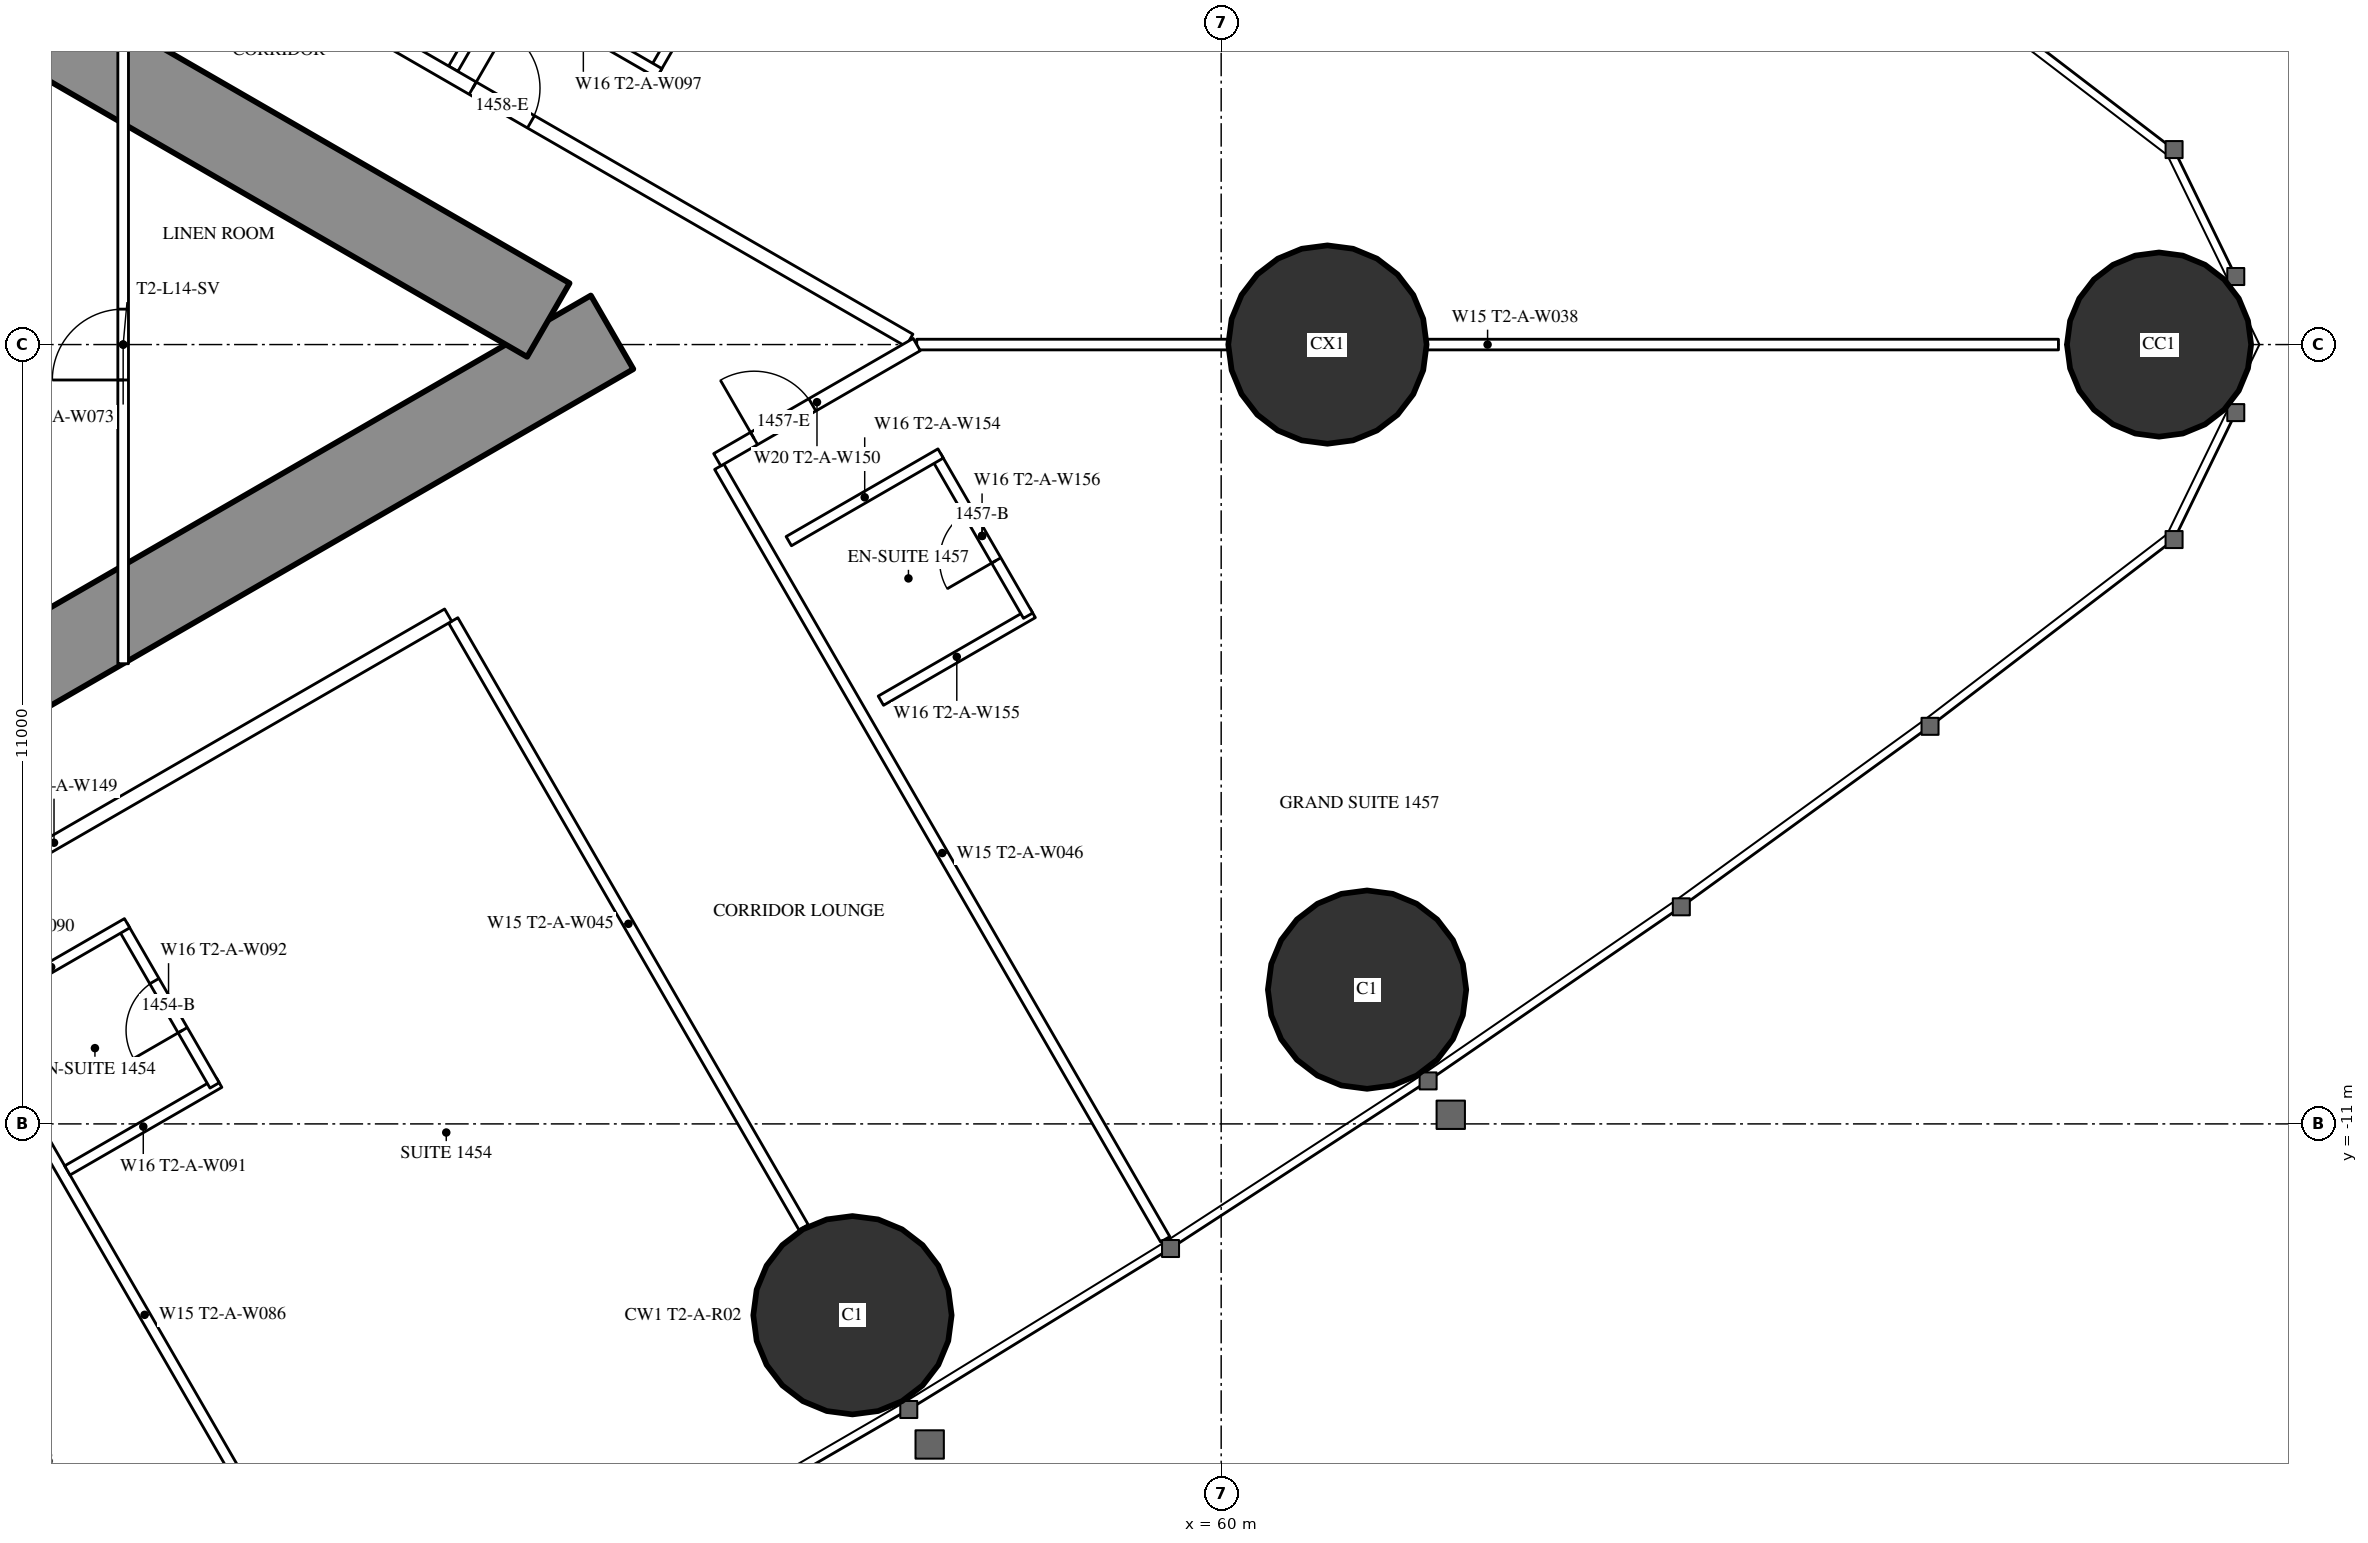
"""IFC4 building model, lengths in metres.
Left out: names, types, materials, properties, quantities, classifications, styles, units other than length and angle.
Written with IfcOpenShell. Run it as: python <this file> out.ifc"""

import sys

from ifc_helpers import new_model, si_unit, direction, frame, frame_2d, origin, origin_2d, place, context, subcontext, project, spatial, rectangle, hollow_circle, extrude, element, fill, save


model = new_model("IFC4")
c1 = context("Model", 3, precision=1e-05, world=origin(), true_north=direction((0.0, 1.0)))
c2 = subcontext(c1, "Body", "Model", "MODEL_VIEW")
j1 = project(units=[si_unit("LENGTHUNIT", "METRE"), si_unit("PLANEANGLEUNIT", "RADIAN")], contexts=[c1])
p1 = place(None, origin())
s1 = spatial("IfcSite", under=j1, at=p1, CompositionType="ELEMENT")
p2 = place(p1, origin())
s2 = spatial("IfcBuilding", under=s1, at=p2, CompositionType="ELEMENT")
p3 = place(p2, frame((0.0, 0.0, 56.5)))
s3 = spatial("IfcBuildingStorey", under=s2, at=p3, CompositionType="ELEMENT", Elevation=56.5)
p4 = place(p3, frame((73.239, 0.0, 0.0), z_axis=(0.0, 0.0, 1.0), x_axis=(1.0, 0.0, 0.0)))
e1 = element("IfcColumn", 1, at=p4, inside=s3, PredefinedType="COLUMN", context=c2, shape_type="SweptSolid", body=[
    extrude(hollow_circle(Radius=1.3, WallThickness=0.1, at=origin_2d()), origin(), (0.0, 0.0, 1.0), 3.5),
])
for number, where, z_axis, x_axis in (
    (2, (54.795, -13.701, 0.0), (0.0, 0.0, 1.0), (1.0, 0.0, 0.0)),
    (3, (62.059, -9.105, 0.0), (0.0, 0.0, 1.0), (1.0, 0.0, 0.0)),
):
    element("IfcColumn", number, at=place(p3, frame(where, z_axis=z_axis, x_axis=x_axis)), inside=s3, PredefinedType="COLUMN", context=c2, shape_type="SweptSolid", body=[
        extrude(hollow_circle(Radius=1.4, WallThickness=0.12, at=origin_2d()), origin(), (0.0, 0.0, 1.0), 3.5),
    ])
p5 = place(p3, frame((61.5, 0.0, 0.0), z_axis=(0.0, 0.0, 1.0), x_axis=(1.0, 0.0, 0.0)))
e4 = element("IfcColumn", 4, at=p5, inside=s3, PredefinedType="COLUMN", context=c2, shape_type="SweptSolid", body=[
    extrude(hollow_circle(Radius=1.4, WallThickness=0.1, at=origin_2d()), origin(), (0.0, 0.0, 1.0), 3.5),
])
p6 = place(p3, frame((27.2, -13.8, 0.0), z_axis=(0.0, 0.0, 1.0), x_axis=(0.866027159892, 0.499996958321, 0.0)))
e5 = element("IfcWall", 5, at=p6, inside=s3, PredefinedType="SHEAR", context=c2, shape_type="SweptSolid", body=[
    extrude(rectangle(XDim=27.947, YDim=1.2, at=frame_2d((13.973, 0.0))), origin(), (0.0, 0.0, 1.0), 3.5),
])
p7 = place(p6, frame((4.6, 0.0, 0.0)))
e6 = element("IfcOpeningElement", 6, at=p7, cuts=e5, PredefinedType="OPENING", context=c2, shape_type="SweptSolid", body=[
    extrude(rectangle(XDim=1.0, YDim=2.2, at=frame_2d((0.5, 1.1))), frame((0.0, 0.61, 0.0), z_axis=(0.0, -1.0, 0.0), x_axis=(1.0, 0.0, 0.0)), (0.0, 0.0, 1.0), 1.22),
])
p8 = place(p6, frame((13.395, 0.0, 0.0)))
e7 = element("IfcOpeningElement", 7, at=p8, cuts=e5, PredefinedType="OPENING", context=c2, shape_type="SweptSolid", body=[
    extrude(rectangle(XDim=1.8, YDim=2.2, at=frame_2d((0.9, 1.1))), frame((0.0, 0.61, 0.0), z_axis=(0.0, -1.0, 0.0), x_axis=(1.0, 0.0, 0.0)), (0.0, 0.0, 1.0), 1.22),
])
p9 = place(p3, frame((27.2, 13.8, 0.0), z_axis=(0.0, 0.0, 1.0), x_axis=(0.866024515034, -0.500001539357, 0.0)))
e8 = element("IfcWall", 8, at=p9, inside=s3, PredefinedType="SHEAR", context=c2, shape_type="SweptSolid", body=[
    extrude(rectangle(XDim=26.907, YDim=1.2, at=frame_2d((13.454, 0.0))), origin(), (0.0, 0.0, 1.0), 3.5),
])
p10 = place(p9, frame((4.6, 0.0, 0.0)))
e9 = element("IfcOpeningElement", 9, at=p10, cuts=e8, PredefinedType="OPENING", context=c2, shape_type="SweptSolid", body=[
    extrude(rectangle(XDim=1.0, YDim=2.2, at=frame_2d((0.5, 1.1))), frame((0.0, 0.61, 0.0), z_axis=(0.0, -1.0, 0.0), x_axis=(1.0, 0.0, 0.0)), (0.0, 0.0, 1.0), 1.22),
])
p11 = place(p9, frame((13.395, 0.0, 0.0)))
e10 = element("IfcOpeningElement", 10, at=p11, cuts=e8, PredefinedType="OPENING", context=c2, shape_type="SweptSolid", body=[
    extrude(rectangle(XDim=1.8, YDim=2.2, at=frame_2d((0.9, 1.1))), frame((0.0, 0.61, 0.0), z_axis=(0.0, -1.0, 0.0), x_axis=(1.0, 0.0, 0.0)), (0.0, 0.0, 1.0), 1.22),
])
p12 = place(p3, frame((41.647, -8.23, 0.0), z_axis=(0.0, 0.0, 1.0), x_axis=(0.49998590462, -0.866033541603, 0.0)))
e11 = element("IfcWall", 11, at=p12, inside=s3, PredefinedType="PARTITIONING", context=c2, shape_type="SweptSolid", body=[
    extrude(rectangle(XDim=12.621, YDim=0.15, at=frame_2d((6.311, 0.0))), origin(), (0.0, 0.0, 1.0), 3.25),
])
p13 = place(p3, frame((49.159, -3.893, 0.0), z_axis=(0.0, 0.0, 1.0), x_axis=(0.499998773722, -0.866026111775, 0.0)))
e12 = element("IfcWall", 12, at=p13, inside=s3, PredefinedType="PARTITIONING", context=c2, shape_type="SweptSolid", body=[
    extrude(rectangle(XDim=9.892, YDim=0.15, at=frame_2d((4.946, 0.0))), origin(), (0.0, 0.0, 1.0), 2.25),
])
p14 = place(p3, frame((52.915, -1.725, 0.0), z_axis=(0.0, 0.0, 1.0), x_axis=(0.499997163113, -0.866027041656, 0.0)))
e13 = element("IfcWall", 13, at=p14, inside=s3, PredefinedType="PARTITIONING", context=c2, shape_type="SweptSolid", body=[
    extrude(rectangle(XDim=12.591, YDim=0.15, at=frame_2d((6.295, 0.0))), origin(), (0.0, 0.0, 1.0), 3.25),
])
p15 = place(p3, frame((49.159, 3.893, 0.0), z_axis=(0.0, 0.0, 1.0), x_axis=(0.499995664361, 0.866027906952, 0.0)))
e14 = element("IfcWall", 14, at=p15, inside=s3, PredefinedType="PARTITIONING", context=c2, shape_type="SweptSolid", body=[
    extrude(rectangle(XDim=12.711, YDim=0.15, at=frame_2d((6.356, 0.0))), origin(), (0.0, 0.0, 1.0), 3.25),
])
p16 = place(p3, frame((55.702, 0.0, 0.0), z_axis=(0.0, 0.0, 1.0), x_axis=(1.0, 0.0, 0.0)))
e15 = element("IfcWall", 15, at=p16, inside=s3, PredefinedType="PARTITIONING", context=c2, shape_type="SweptSolid", body=[
    extrude(rectangle(XDim=16.117, YDim=0.15, at=frame_2d((8.059, 0.0))), origin(), (0.0, 0.0, 1.0), 2.25),
])
p17 = place(p3, frame((36.834, 10.894, 0.0), z_axis=(0.0, 0.0, 1.0), x_axis=(0.866028157229, -0.499995230863, 0.0)))
e16 = element("IfcWall", 16, at=p17, inside=s3, PredefinedType="PARTITIONING", context=c2, shape_type="SweptSolid", body=[
    extrude(rectangle(XDim=21.667, YDim=0.2, at=frame_2d((10.833, 0.0))), origin(), (0.0, 0.0, 1.0), 3.25),
])
p18 = place(p17, frame((14.55, 0.0, 0.0)))
e17 = element("IfcOpeningElement", 17, at=p18, cuts=e16, PredefinedType="OPENING", context=c2, shape_type="SweptSolid", body=[
    extrude(rectangle(XDim=0.95, YDim=2.2, at=frame_2d((0.475, 1.1))), frame((0.0, 0.11, 0.0), z_axis=(0.0, -1.0, 0.0), x_axis=(1.0, 0.0, 0.0)), (0.0, 0.0, 1.0), 0.22),
])
p19 = place(p17, frame((10.5, 0.0, 0.0)))
e18 = element("IfcOpeningElement", 18, at=p19, cuts=e16, PredefinedType="OPENING", context=c2, shape_type="SweptSolid", body=[
    extrude(rectangle(XDim=0.95, YDim=2.2, at=frame_2d((0.475, 1.1))), frame((0.0, 0.11, 0.0), z_axis=(0.0, -1.0, 0.0), x_axis=(1.0, 0.0, 0.0)), (0.0, 0.0, 1.0), 0.22),
])
p20 = place(p17, frame((4.292, 0.0, 0.0)))
e19 = element("IfcOpeningElement", 19, at=p20, cuts=e16, PredefinedType="OPENING", context=c2, shape_type="SweptSolid", body=[
    extrude(rectangle(XDim=1.0, YDim=2.2, at=frame_2d((0.5, 1.1))), frame((0.0, 0.11, 0.0), z_axis=(0.0, -1.0, 0.0), x_axis=(1.0, 0.0, 0.0)), (0.0, 0.0, 1.0), 0.22),
])
p21 = place(p17, frame((0.246, 0.0, 0.0)))
e20 = element("IfcOpeningElement", 20, at=p21, cuts=e16, PredefinedType="OPENING", context=c2, shape_type="SweptSolid", body=[
    extrude(rectangle(XDim=0.9, YDim=2.2, at=frame_2d((0.45, 1.1))), frame((0.0, 0.11, 0.0), z_axis=(0.0, -1.0, 0.0), x_axis=(1.0, 0.0, 0.0)), (0.0, 0.0, 1.0), 0.22),
])
p22 = place(p3, frame((37.96, -10.243, 0.0), z_axis=(0.0, 0.0, 1.0), x_axis=(0.866030548046, 0.499991089772, 0.0)))
e21 = element("IfcWall", 21, at=p22, inside=s3, PredefinedType="PARTITIONING", context=c2, shape_type="SweptSolid", body=[
    extrude(rectangle(XDim=12.849, YDim=0.2, at=frame_2d((6.425, 0.0))), origin(), (0.0, 0.0, 1.0), 3.25),
])
p23 = place(p22, frame((4.575, 0.0, 0.0)))
e22 = element("IfcOpeningElement", 22, at=p23, cuts=e21, PredefinedType="OPENING", context=c2, shape_type="SweptSolid", body=[
    extrude(rectangle(XDim=0.95, YDim=2.2, at=frame_2d((0.475, 1.1))), frame((0.0, 0.11, 0.0), z_axis=(0.0, -1.0, 0.0), x_axis=(1.0, 0.0, 0.0)), (0.0, 0.0, 1.0), 0.22),
])
p24 = place(p22, frame((0.6, 0.0, 0.0)))
e23 = element("IfcOpeningElement", 23, at=p24, cuts=e21, PredefinedType="OPENING", context=c2, shape_type="SweptSolid", body=[
    extrude(rectangle(XDim=0.95, YDim=2.2, at=frame_2d((0.475, 1.1))), frame((0.0, 0.11, 0.0), z_axis=(0.0, -1.0, 0.0), x_axis=(1.0, 0.0, 0.0)), (0.0, 0.0, 1.0), 0.22),
])
p25 = place(p3, frame((52.886, -1.626, 0.0), z_axis=(0.0, 0.0, 1.0), x_axis=(0.866030540913, 0.499991102127, 0.0)))
e24 = element("IfcWall", 24, at=p25, inside=s3, PredefinedType="PARTITIONING", context=c2, shape_type="SweptSolid", body=[
    extrude(rectangle(XDim=3.251, YDim=0.2, at=frame_2d((1.626, 0.0))), origin(), (0.0, 0.0, 1.0), 3.25),
])
p26 = place(p25, frame((0.6, 0.0, 0.0)))
e25 = element("IfcOpeningElement", 25, at=p26, cuts=e24, PredefinedType="OPENING", context=c2, shape_type="SweptSolid", body=[
    extrude(rectangle(XDim=0.95, YDim=2.2, at=frame_2d((0.475, 1.1))), frame((0.0, 0.11, 0.0), z_axis=(0.0, -1.0, 0.0), x_axis=(1.0, 0.0, 0.0)), (0.0, 0.0, 1.0), 0.22),
])
p27 = place(p3, frame((43.712, -11.657, 0.0), z_axis=(0.0, 0.0, 1.0), x_axis=(0.866006523861, 0.500032699561, 0.0)))
e26 = element("IfcWall", 26, at=p27, inside=s3, PredefinedType="PARTITIONING", context=c2, shape_type="SweptSolid", body=[
    extrude(rectangle(XDim=2.475, YDim=0.15, at=frame_2d((1.237, 0.0))), origin(), (0.0, 0.0, 1.0), 3.25),
])
p28 = place(p3, frame((44.491, -8.205, 0.0), z_axis=(0.0, 0.0, 1.0), x_axis=(0.500047596559, -0.865997922154, 0.0)))
e27 = element("IfcWall", 27, at=p28, inside=s3, PredefinedType="PARTITIONING", context=c2, shape_type="SweptSolid", body=[
    extrude(rectangle(XDim=2.6, YDim=0.15, at=frame_2d((1.3, 0.0))), origin(), (0.0, 0.0, 1.0), 3.25),
])
p29 = place(p28, frame((0.9, 0.0, 0.0)))
e28 = element("IfcOpeningElement", 28, at=p29, cuts=e27, PredefinedType="OPENING", context=c2, shape_type="SweptSolid", body=[
    extrude(rectangle(XDim=0.8, YDim=2.2, at=frame_2d((0.4, 1.1))), frame((0.0, 0.085, 0.0), z_axis=(0.0, -1.0, 0.0), x_axis=(1.0, 0.0, 0.0)), (0.0, 0.0, 1.0), 0.17),
])
p30 = place(p3, frame((42.412, -9.405, 0.0), z_axis=(0.0, 0.0, 1.0), x_axis=(0.866006523861, 0.500032699561, 0.0)))
e29 = element("IfcWall", 29, at=p30, inside=s3, PredefinedType="PARTITIONING", context=c2, shape_type="SweptSolid", body=[
    extrude(rectangle(XDim=2.475, YDim=0.15, at=frame_2d((1.237, 0.0))), origin(), (0.0, 0.0, 1.0), 3.25),
])
p31 = place(p3, frame((55.196, -5.026, 0.0), z_axis=(0.0, 0.0, 1.0), x_axis=(0.866073894602, 0.499916002032, 0.0)))
e30 = element("IfcWall", 30, at=p31, inside=s3, PredefinedType="PARTITIONING", context=c2, shape_type="SweptSolid", body=[
    extrude(rectangle(XDim=2.475, YDim=0.15, at=frame_2d((1.238, 0.0))), origin(), (0.0, 0.0, 1.0), 3.25),
])
p32 = place(p3, frame((55.975, -1.575, 0.0), z_axis=(0.0, 0.0, 1.0), x_axis=(0.500006934395, -0.866021400173, 0.0)))
e31 = element("IfcWall", 31, at=p32, inside=s3, PredefinedType="PARTITIONING", context=c2, shape_type="SweptSolid", body=[
    extrude(rectangle(XDim=2.6, YDim=0.15, at=frame_2d((1.3, 0.0))), origin(), (0.0, 0.0, 1.0), 3.25),
])
p33 = place(p32, frame((0.9, 0.0, 0.0)))
e32 = element("IfcOpeningElement", 32, at=p33, cuts=e31, PredefinedType="OPENING", context=c2, shape_type="SweptSolid", body=[
    extrude(rectangle(XDim=0.8, YDim=2.2, at=frame_2d((0.4, 1.1))), frame((0.0, 0.085, 0.0), z_axis=(0.0, -1.0, 0.0), x_axis=(1.0, 0.0, 0.0)), (0.0, 0.0, 1.0), 0.17),
])
p34 = place(p3, frame((53.896, -2.775, 0.0), z_axis=(0.0, 0.0, 1.0), x_axis=(0.866006523861, 0.500032699561, 0.0)))
e33 = element("IfcWall", 33, at=p34, inside=s3, PredefinedType="PARTITIONING", context=c2, shape_type="SweptSolid", body=[
    extrude(rectangle(XDim=2.475, YDim=0.15, at=frame_2d((1.237, 0.0))), origin(), (0.0, 0.0, 1.0), 3.25),
])
p35 = place(p3, frame((52.003, 3.868, 0.0), z_axis=(0.0, 0.0, 1.0), x_axis=(0.500047596559, 0.865997922154, 0.0)))
e34 = element("IfcWall", 34, at=p35, inside=s3, PredefinedType="PARTITIONING", context=c2, shape_type="SweptSolid", body=[
    extrude(rectangle(XDim=2.6, YDim=0.15, at=frame_2d((1.3, 0.0))), origin(), (0.0, 0.0, 1.0), 3.25),
])
p36 = place(p35, frame((0.9, 0.0, 0.0)))
e35 = element("IfcOpeningElement", 35, at=p36, cuts=e34, PredefinedType="OPENING", context=c2, shape_type="SweptSolid", body=[
    extrude(rectangle(XDim=0.8, YDim=2.2, at=frame_2d((0.4, 1.1))), frame((0.0, 0.085, 0.0), z_axis=(0.0, -1.0, 0.0), x_axis=(1.0, 0.0, 0.0)), (0.0, 0.0, 1.0), 0.17),
])
p37 = place(p3, frame((49.925, 5.068, 0.0), z_axis=(0.0, 0.0, 1.0), x_axis=(0.866006523861, -0.500032699561, 0.0)))
e36 = element("IfcWall", 36, at=p37, inside=s3, PredefinedType="PARTITIONING", context=c2, shape_type="SweptSolid", body=[
    extrude(rectangle(XDim=2.475, YDim=0.15, at=frame_2d((1.237, 0.0))), origin(), (0.0, 0.0, 1.0), 3.25),
])
p38 = place(p3, frame((44.5, -4.505, 0.0), z_axis=(0.0, 0.0, 1.0), x_axis=(0.0, 1.0, 0.0)))
e37 = element("IfcWall", 37, at=p38, inside=s3, PredefinedType="PARTITIONING", context=c2, shape_type="SweptSolid", body=[
    extrude(rectangle(XDim=9.009, YDim=0.15, at=frame_2d((4.505, 0.0))), origin(), (0.0, 0.0, 1.0), 2.45),
])
p39 = place(p38, frame((4.005, 0.0, 0.0)))
e38 = element("IfcOpeningElement", 38, at=p39, cuts=e37, PredefinedType="OPENING", context=c2, shape_type="SweptSolid", body=[
    extrude(rectangle(XDim=1.0, YDim=2.2, at=frame_2d((0.5, 1.1))), frame((0.0, 0.085, 0.0), z_axis=(0.0, -1.0, 0.0), x_axis=(1.0, 0.0, 0.0)), (0.0, 0.0, 1.0), 0.17),
])
p40 = place(p29, origin())
e39 = element("IfcDoor", 39, at=p40, inside=s3, OperationType="SINGLE_SWING_RIGHT", PredefinedType="DOOR", context=c2, shape_type="SweptSolid", body=[
    extrude(rectangle(XDim=0.8, YDim=2.2, at=frame_2d((0.4, 1.1))), frame((0.0, 0.025, 0.0), z_axis=(0.0, -1.0, 0.0), x_axis=(1.0, 0.0, 0.0)), (0.0, 0.0, 1.0), 0.05),
])
fill(e28, e39)
p41 = place(p33, origin())
e40 = element("IfcDoor", 40, at=p41, inside=s3, OperationType="SINGLE_SWING_RIGHT", PredefinedType="DOOR", context=c2, shape_type="SweptSolid", body=[
    extrude(rectangle(XDim=0.8, YDim=2.2, at=frame_2d((0.4, 1.1))), frame((0.0, 0.025, 0.0), z_axis=(0.0, -1.0, 0.0), x_axis=(1.0, 0.0, 0.0)), (0.0, 0.0, 1.0), 0.05),
])
fill(e32, e40)
p42 = place(p26, origin())
e41 = element("IfcDoor", 41, at=p42, inside=s3, OperationType="SINGLE_SWING_LEFT", PredefinedType="DOOR", context=c2, shape_type="SweptSolid", body=[
    extrude(rectangle(XDim=0.95, YDim=2.2, at=frame_2d((0.475, 1.1))), frame((0.0, 0.025, 0.0), z_axis=(0.0, -1.0, 0.0), x_axis=(1.0, 0.0, 0.0)), (0.0, 0.0, 1.0), 0.05),
])
fill(e25, e41)
p43 = place(p18, origin())
e42 = element("IfcDoor", 42, at=p43, inside=s3, OperationType="SINGLE_SWING_LEFT", PredefinedType="DOOR", context=c2, shape_type="SweptSolid", body=[
    extrude(rectangle(XDim=0.95, YDim=2.2, at=frame_2d((0.475, 1.1))), frame((0.0, 0.025, 0.0), z_axis=(0.0, -1.0, 0.0), x_axis=(1.0, 0.0, 0.0)), (0.0, 0.0, 1.0), 0.05),
])
fill(e17, e42)
p44 = place(p39, origin())
e43 = element("IfcDoor", 43, at=p44, inside=s3, OperationType="SINGLE_SWING_LEFT", PredefinedType="DOOR", context=c2, shape_type="SweptSolid", body=[
    extrude(rectangle(XDim=1.0, YDim=2.2, at=frame_2d((0.5, 1.1))), frame((0.0, 0.025, 0.0), z_axis=(0.0, -1.0, 0.0), x_axis=(1.0, 0.0, 0.0)), (0.0, 0.0, 1.0), 0.05),
])
fill(e38, e43)
save(model, sys.argv[1])
